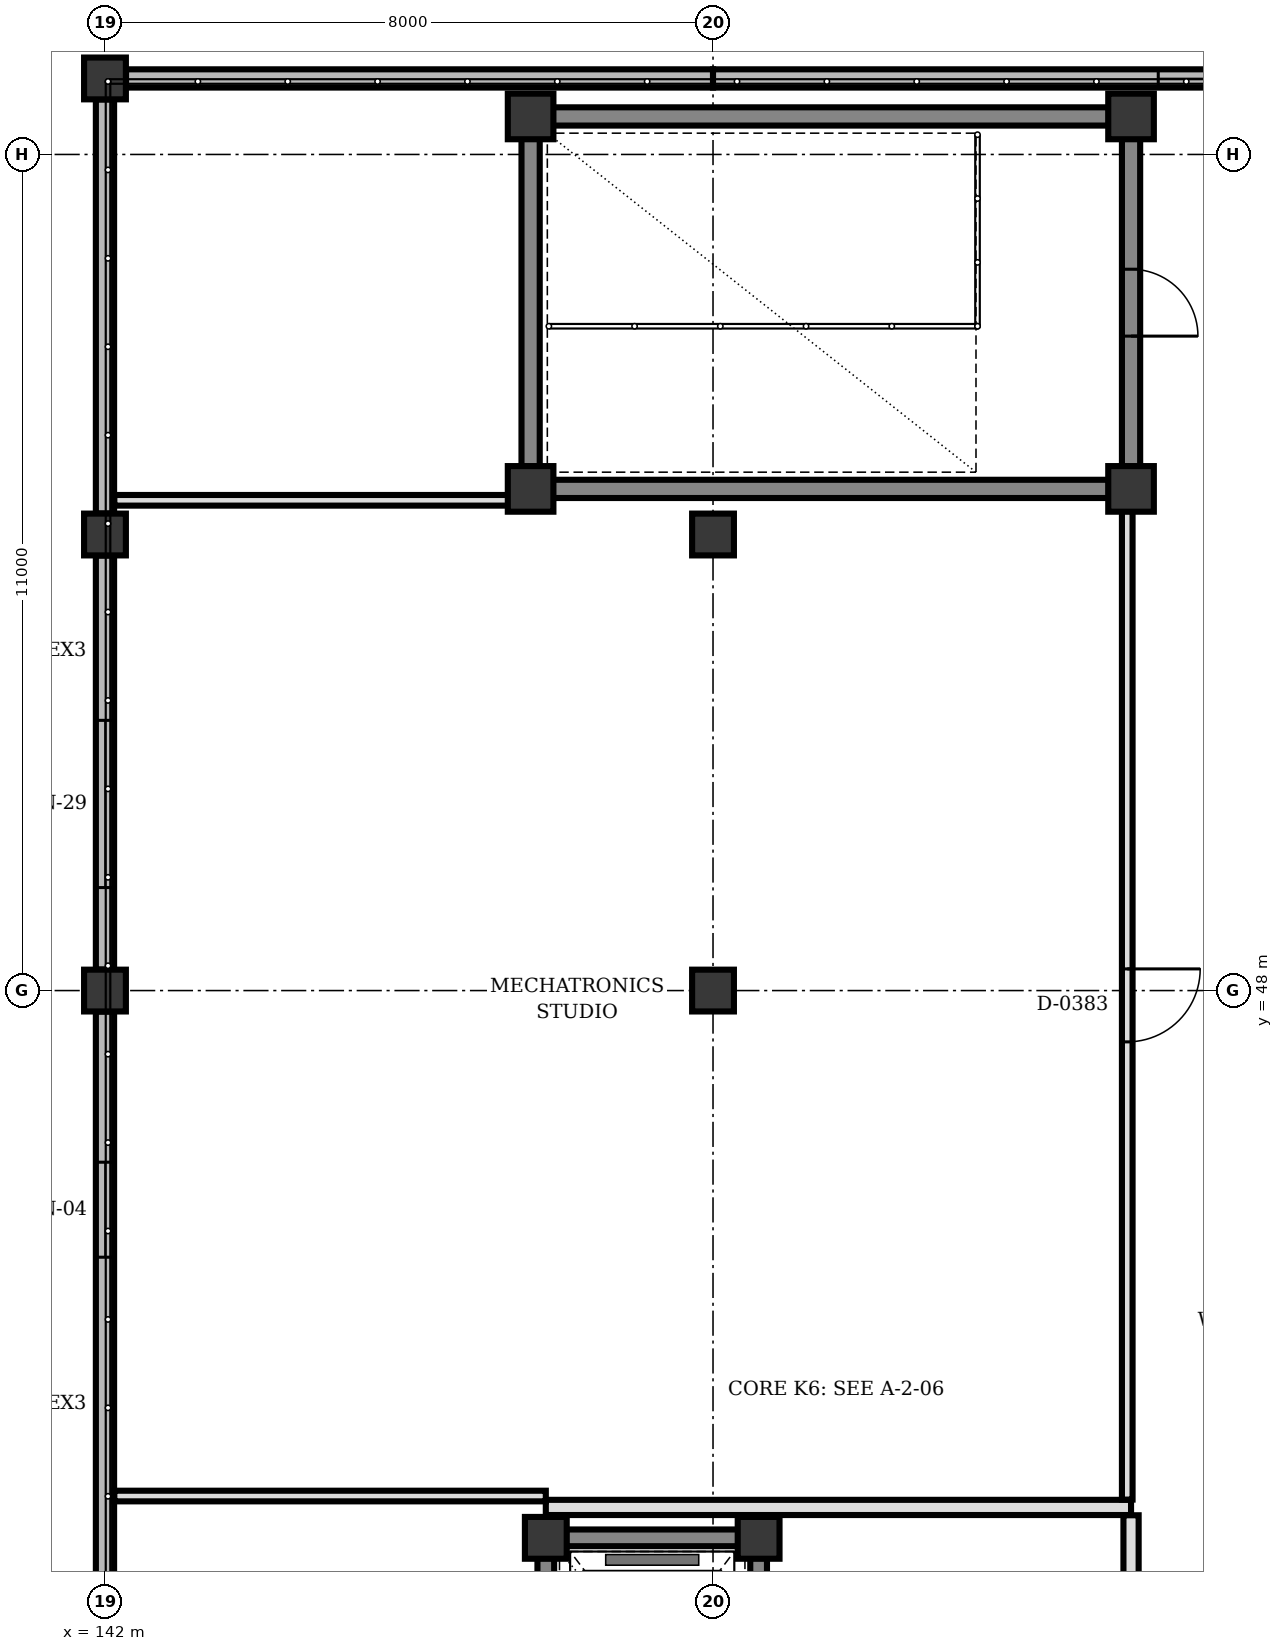
"""IFC4 building model, lengths in metres.
Left out: names, types, materials, properties, quantities, classifications, styles, units other than length and angle.
Written with IfcOpenShell. Run it as: python <this file> out.ifc"""

import sys

from ifc_helpers import new_model, si_unit, direction, frame, frame_2d, origin, origin_2d, place, context, subcontext, project, spatial, rectangle, extrude, element, fill, save


model = new_model("IFC4")
c1 = context("Model", 3, precision=1e-05, world=origin(), true_north=direction((0.0, 1.0)))
c2 = subcontext(c1, "Body", "Model", "MODEL_VIEW")
j1 = project(units=[si_unit("LENGTHUNIT", "METRE"), si_unit("PLANEANGLEUNIT", "RADIAN")], contexts=[c1])
p1 = place(None, origin())
s1 = spatial("IfcSite", under=j1, at=p1, CompositionType="ELEMENT")
p2 = place(p1, origin())
s2 = spatial("IfcBuilding", under=s1, at=p2, CompositionType="ELEMENT")
p3 = place(p2, frame((0.0, 0.0, 12.5)))
s3 = spatial("IfcBuildingStorey", under=s2, at=p3, CompositionType="ELEMENT", Elevation=12.5)
for number, where, z_axis, x_axis in (
    (1, (147.6, 54.6, 0.0), (0.0, 0.0, 1.0), (1.0, 0.0, 0.0)),
    (2, (155.5, 54.6, 0.0), (0.0, 0.0, 1.0), (1.0, 0.0, 0.0)),
    (3, (155.5, 59.5, 0.0), (0.0, 0.0, 1.0), (1.0, 0.0, 0.0)),
    (4, (147.6, 59.5, 0.0), (0.0, 0.0, 1.0), (1.0, 0.0, 0.0)),
):
    element("IfcColumn", number, at=place(p3, frame(where, z_axis=z_axis, x_axis=x_axis)), inside=s3, PredefinedType="COLUMN", context=c2, shape_type="SweptSolid", body=[
        extrude(rectangle(XDim=0.6, YDim=0.6, at=origin_2d()), origin(), (0.0, 0.0, 1.0), 4.0),
    ])
for number, where, z_axis, x_axis in (
    (5, (150.6, 40.8, 0.0), (0.0, 0.0, 1.0), (1.0, 0.0, 0.0)),
    (6, (147.8, 40.8, 0.0), (0.0, 0.0, 1.0), (1.0, 0.0, 0.0)),
    (7, (142.0, 48.0, 0.0), (0.0, 0.0, 1.0), (1.0, 0.0, 0.0)),
    (8, (142.0, 54.0, 0.0), (0.0, 0.0, 1.0), (1.0, 0.0, 0.0)),
    (9, (142.0, 60.0, 0.0), (0.0, 0.0, 1.0), (1.0, 0.0, 0.0)),
    (10, (150.0, 48.0, 0.0), (0.0, 0.0, 1.0), (1.0, 0.0, 0.0)),
    (11, (150.0, 54.0, 0.0), (0.0, 0.0, 1.0), (1.0, 0.0, 0.0)),
):
    element("IfcColumn", number, at=place(p3, frame(where, z_axis=z_axis, x_axis=x_axis)), inside=s3, PredefinedType="COLUMN", context=c2, shape_type="SweptSolid", body=[
        extrude(rectangle(XDim=0.55, YDim=0.55, at=origin_2d()), origin(), (0.0, 0.0, 1.0), 4.0),
    ])
p4 = place(p3, frame((142.0, 40.277, 0.0), z_axis=(0.0, 0.0, 1.0), x_axis=(0.0, 1.0, 0.0)))
e12 = element("IfcWall", 12, at=p4, inside=s3, PredefinedType="SOLIDWALL", context=c2, shape_type="SweptSolid", body=[
    extrude(rectangle(XDim=7.446, YDim=0.24, at=frame_2d((3.723, 0.0))), origin(), (0.0, 0.0, 1.0), 3.494),
])
p5 = place(p4, frame((4.215, 0.0, 0.9)))
e13 = element("IfcOpeningElement", 13, at=p5, cuts=e12, PredefinedType="OPENING", context=c2, shape_type="SweptSolid", body=[
    extrude(rectangle(XDim=1.25, YDim=1.1, at=frame_2d((0.625, 0.55))), frame((0.0, 0.13, 0.0), z_axis=(0.0, -1.0, 0.0), x_axis=(1.0, 0.0, 0.0)), (0.0, 0.0, 1.0), 0.26),
])
p6 = place(p3, frame((142.0, 48.277, 0.0), z_axis=(0.0, 0.0, 1.0), x_axis=(0.0, 1.0, 0.0)))
e14 = element("IfcWall", 14, at=p6, inside=s3, PredefinedType="SOLIDWALL", context=c2, shape_type="SweptSolid", body=[
    extrude(rectangle(XDim=5.446, YDim=0.24, at=frame_2d((2.723, 0.0))), origin(), (0.0, 0.0, 1.0), 3.442),
])
p7 = place(p6, frame((1.078, 0.0, 0.9)))
e15 = element("IfcOpeningElement", 15, at=p7, cuts=e14, PredefinedType="OPENING", context=c2, shape_type="SweptSolid", body=[
    extrude(rectangle(XDim=2.2, YDim=1.4, at=frame_2d((1.1, 0.7))), frame((0.0, 0.13, 0.0), z_axis=(0.0, -1.0, 0.0), x_axis=(1.0, 0.0, 0.0)), (0.0, 0.0, 1.0), 0.26),
])
p8 = place(p3, frame((142.0, 54.277, 0.0), z_axis=(0.0, 0.0, 1.0), x_axis=(0.0, 1.0, 0.0)))
e16 = element("IfcWall", 16, at=p8, inside=s3, PredefinedType="SOLIDWALL", context=c2, shape_type="SweptSolid", body=[
    extrude(rectangle(XDim=5.446, YDim=0.24, at=frame_2d((2.723, 0.0))), origin(), (0.0, 0.0, 1.0), 3.494),
])
p9 = place(p3, frame((142.277, 60.0, 0.0), z_axis=(0.0, 0.0, 1.0), x_axis=(1.0, 0.0, 0.0)))
e17 = element("IfcWall", 17, at=p9, inside=s3, PredefinedType="SOLIDWALL", context=c2, shape_type="SweptSolid", body=[
    extrude(rectangle(XDim=7.723, YDim=0.24, at=frame_2d((3.861, 0.0))), origin(), (0.0, 0.0, 1.0), 3.55),
])
p10 = place(p3, frame((150.0, 60.0, 0.0), z_axis=(0.0, 0.0, 1.0), x_axis=(1.0, 0.0, 0.0)))
e18 = element("IfcWall", 18, at=p10, inside=s3, PredefinedType="SOLIDWALL", context=c2, shape_type="SweptSolid", body=[
    extrude(rectangle(XDim=7.723, YDim=0.24, at=frame_2d((3.861, 0.0))), origin(), (0.0, 0.0, 1.0), 3.55),
])
p11 = place(p10, frame((5.858, 0.0, 0.9)))
e19 = element("IfcOpeningElement", 19, at=p11, cuts=e18, PredefinedType="OPENING", context=c2, shape_type="SweptSolid", body=[
    extrude(rectangle(XDim=0.95, YDim=1.1, at=frame_2d((0.475, 0.55))), frame((0.0, 0.13, 0.0), z_axis=(0.0, -1.0, 0.0), x_axis=(1.0, 0.0, 0.0)), (0.0, 0.0, 1.0), 0.26),
])
p12 = place(p3, frame((147.6, 54.892, 0.0), z_axis=(0.0, 0.0, 1.0), x_axis=(0.0, 1.0, 0.0)))
e20 = element("IfcWall", 20, at=p12, inside=s3, PredefinedType="SHEAR", context=c2, shape_type="SweptSolid", body=[
    extrude(rectangle(XDim=4.316, YDim=0.24, at=frame_2d((2.158, 0.0))), origin(), (0.0, 0.0, 1.0), 3.74),
])
p13 = place(p3, frame((155.5, 59.208, 0.0), z_axis=(0.0, 0.0, 1.0), x_axis=(0.0, -1.0, 0.0)))
e21 = element("IfcWall", 21, at=p13, inside=s3, PredefinedType="SHEAR", context=c2, shape_type="SweptSolid", body=[
    extrude(rectangle(XDim=4.316, YDim=0.24, at=frame_2d((2.158, 0.0))), origin(), (0.0, 0.0, 1.0), 3.74),
])
p14 = place(p13, frame((1.718, 0.0, 0.0)))
e22 = element("IfcOpeningElement", 22, at=p14, cuts=e21, PredefinedType="OPENING", context=c2, shape_type="SweptSolid", body=[
    extrude(rectangle(XDim=0.88, YDim=2.1, at=frame_2d((0.44, 1.05))), frame((0.0, 0.13, 0.0), z_axis=(0.0, -1.0, 0.0), x_axis=(1.0, 0.0, 0.0)), (0.0, 0.0, 1.0), 0.26),
])
for number, where, z_axis, x_axis in (
    (23, (155.208, 54.6, 0.0), (0.0, 0.0, 1.0), (-1.0, 0.0, 0.0)),
    (24, (155.208, 59.5, 0.0), (0.0, 0.0, 1.0), (-1.0, 0.0, 0.0)),
):
    element("IfcWall", number, at=place(p3, frame(where, z_axis=z_axis, x_axis=x_axis)), inside=s3, PredefinedType="SHEAR", context=c2, shape_type="SweptSolid", body=[
        extrude(rectangle(XDim=7.316, YDim=0.24, at=frame_2d((3.658, 0.0))), origin(), (0.0, 0.0, 1.0), 3.74),
    ])
p15 = place(p3, frame((150.6, 37.867, 0.0), z_axis=(0.0, 0.0, 1.0), x_axis=(0.0, 1.0, 0.0)))
e25 = element("IfcWall", 25, at=p15, inside=s3, PredefinedType="SHEAR", context=c2, shape_type="SweptSolid", body=[
    extrude(rectangle(XDim=2.666, YDim=0.22, at=frame_2d((1.333, 0.0))), origin(), (0.0, 0.0, 1.0), 3.74),
])
p16 = place(p15, frame((0.733, 0.0, 0.0)))
e26 = element("IfcOpeningElement", 26, at=p16, cuts=e25, PredefinedType="OPENING", context=c2, shape_type="SweptSolid", body=[
    extrude(rectangle(XDim=1.2, YDim=2.15, at=frame_2d((0.6, 1.075))), frame((0.0, 0.12, 0.0), z_axis=(0.0, -1.0, 0.0), x_axis=(1.0, 0.0, 0.0)), (0.0, 0.0, 1.0), 0.24),
])
p17 = place(p3, frame((150.333, 40.8, 0.0), z_axis=(0.0, 0.0, 1.0), x_axis=(-1.0, 0.0, 0.0)))
e27 = element("IfcWall", 27, at=p17, inside=s3, PredefinedType="SHEAR", context=c2, shape_type="SweptSolid", body=[
    extrude(rectangle(XDim=2.266, YDim=0.22, at=frame_2d((1.133, 0.0))), origin(), (0.0, 0.0, 1.0), 3.74),
])
p18 = place(p3, frame((147.8, 40.533, 0.0), z_axis=(0.0, 0.0, 1.0), x_axis=(0.0, -1.0, 0.0)))
e28 = element("IfcWall", 28, at=p18, inside=s3, PredefinedType="SHEAR", context=c2, shape_type="SweptSolid", body=[
    extrude(rectangle(XDim=2.666, YDim=0.22, at=frame_2d((1.333, 0.0))), origin(), (0.0, 0.0, 1.0), 3.74),
])
p19 = place(p3, frame((147.8, 41.2, 0.0), z_axis=(0.0, 0.0, 1.0), x_axis=(1.0, 0.0, 0.0)))
e29 = element("IfcWall", 29, at=p19, inside=s3, PredefinedType="PARTITIONING", context=c2, shape_type="SweptSolid", body=[
    extrude(rectangle(XDim=7.7, YDim=0.2, at=frame_2d((3.85, 0.0))), origin(), (0.0, 0.0, 1.0), 3.7),
])
p20 = place(p3, frame((155.5, 37.703, 0.0), z_axis=(0.0, 0.0, 1.0), x_axis=(0.0, 1.0, 0.0)))
e30 = element("IfcWall", 30, at=p20, inside=s3, PredefinedType="PARTITIONING", context=c2, shape_type="SweptSolid", body=[
    extrude(rectangle(XDim=3.394, YDim=0.2, at=frame_2d((1.697, 0.0))), origin(), (0.0, 0.0, 1.0), 3.7),
])
p21 = place(p20, frame((1.167, 0.0, 0.0)))
e31 = element("IfcOpeningElement", 31, at=p21, cuts=e30, PredefinedType="OPENING", context=c2, shape_type="SweptSolid", body=[
    extrude(rectangle(XDim=1.06, YDim=2.2, at=frame_2d((0.53, 1.1))), frame((0.0, 0.11, 0.0), z_axis=(0.0, -1.0, 0.0), x_axis=(1.0, 0.0, 0.0)), (0.0, 0.0, 1.0), 0.22),
])
p22 = place(p3, frame((142.123, 54.45, 0.0), z_axis=(0.0, 0.0, 1.0), x_axis=(1.0, 0.0, 0.0)))
e32 = element("IfcWall", 32, at=p22, inside=s3, PredefinedType="PARTITIONING", context=c2, shape_type="SweptSolid", body=[
    extrude(rectangle(XDim=5.185, YDim=0.14, at=frame_2d((2.593, 0.0))), origin(), (0.0, 0.0, 1.0), 3.494),
])
p23 = place(p3, frame((155.45, 54.308, 0.0), z_axis=(0.0, 0.0, 1.0), x_axis=(0.0, -1.0, 0.0)))
e33 = element("IfcWall", 33, at=p23, inside=s3, PredefinedType="PARTITIONING", context=c2, shape_type="SweptSolid", body=[
    extrude(rectangle(XDim=13.005, YDim=0.14, at=frame_2d((6.502, 0.0))), origin(), (0.0, 0.0, 1.0), 3.289),
])
p24 = place(p23, frame((6.023, 0.0, 0.0)))
e34 = element("IfcOpeningElement", 34, at=p24, cuts=e33, PredefinedType="OPENING", context=c2, shape_type="SweptSolid", body=[
    extrude(rectangle(XDim=0.96, YDim=2.1, at=frame_2d((0.48, 1.05))), frame((0.0, 0.08, 0.0), z_axis=(0.0, -1.0, 0.0), x_axis=(1.0, 0.0, 0.0)), (0.0, 0.0, 1.0), 0.16),
])
p25 = place(p3, frame((147.8, 41.35, 0.0), z_axis=(0.0, 0.0, 1.0), x_axis=(-1.0, 0.0, 0.0)))
e35 = element("IfcWall", 35, at=p25, inside=s3, PredefinedType="PARTITIONING", context=c2, shape_type="SweptSolid", body=[
    extrude(rectangle(XDim=5.677, YDim=0.14, at=frame_2d((2.838, 0.0))), origin(), (0.0, 0.0, 1.0), 3.494),
])
p26 = place(p5, origin())
e36 = element("IfcWindow", 36, at=p26, inside=s3, PartitioningType="SINGLE_PANEL", PredefinedType="WINDOW", context=c2, shape_type="SweptSolid", body=[
    extrude(rectangle(XDim=1.25, YDim=1.1, at=frame_2d((0.625, 0.55))), frame((0.0, 0.03, 0.0), z_axis=(0.0, -1.0, 0.0), x_axis=(1.0, 0.0, 0.0)), (0.0, 0.0, 1.0), 0.06),
])
fill(e13, e36)
p27 = place(p7, origin())
e37 = element("IfcWindow", 37, at=p27, inside=s3, PartitioningType="SINGLE_PANEL", PredefinedType="WINDOW", context=c2, shape_type="SweptSolid", body=[
    extrude(rectangle(XDim=2.2, YDim=1.4, at=frame_2d((1.1, 0.7))), frame((0.0, 0.03, 0.0), z_axis=(0.0, -1.0, 0.0), x_axis=(1.0, 0.0, 0.0)), (0.0, 0.0, 1.0), 0.06),
])
fill(e15, e37)
p28 = place(p11, origin())
e38 = element("IfcWindow", 38, at=p28, inside=s3, PartitioningType="SINGLE_PANEL", PredefinedType="WINDOW", context=c2, shape_type="SweptSolid", body=[
    extrude(rectangle(XDim=0.95, YDim=1.1, at=frame_2d((0.475, 0.55))), frame((0.0, 0.03, 0.0), z_axis=(0.0, -1.0, 0.0), x_axis=(1.0, 0.0, 0.0)), (0.0, 0.0, 1.0), 0.06),
])
fill(e19, e38)
p29 = place(p14, origin())
e39 = element("IfcDoor", 39, at=p29, inside=s3, OperationType="SINGLE_SWING_RIGHT", PredefinedType="DOOR", context=c2, shape_type="SweptSolid", body=[
    extrude(rectangle(XDim=0.88, YDim=2.1, at=frame_2d((0.44, 1.05))), frame((0.0, 0.025, 0.0), z_axis=(0.0, -1.0, 0.0), x_axis=(1.0, 0.0, 0.0)), (0.0, 0.0, 1.0), 0.05),
])
fill(e22, e39)
p30 = place(p24, origin())
e40 = element("IfcDoor", 40, at=p30, inside=s3, OperationType="SINGLE_SWING_LEFT", PredefinedType="DOOR", context=c2, shape_type="SweptSolid", body=[
    extrude(rectangle(XDim=0.96, YDim=2.1, at=frame_2d((0.48, 1.05))), frame((0.0, 0.025, 0.0), z_axis=(0.0, -1.0, 0.0), x_axis=(1.0, 0.0, 0.0)), (0.0, 0.0, 1.0), 0.05),
])
fill(e34, e40)
save(model, sys.argv[1])
